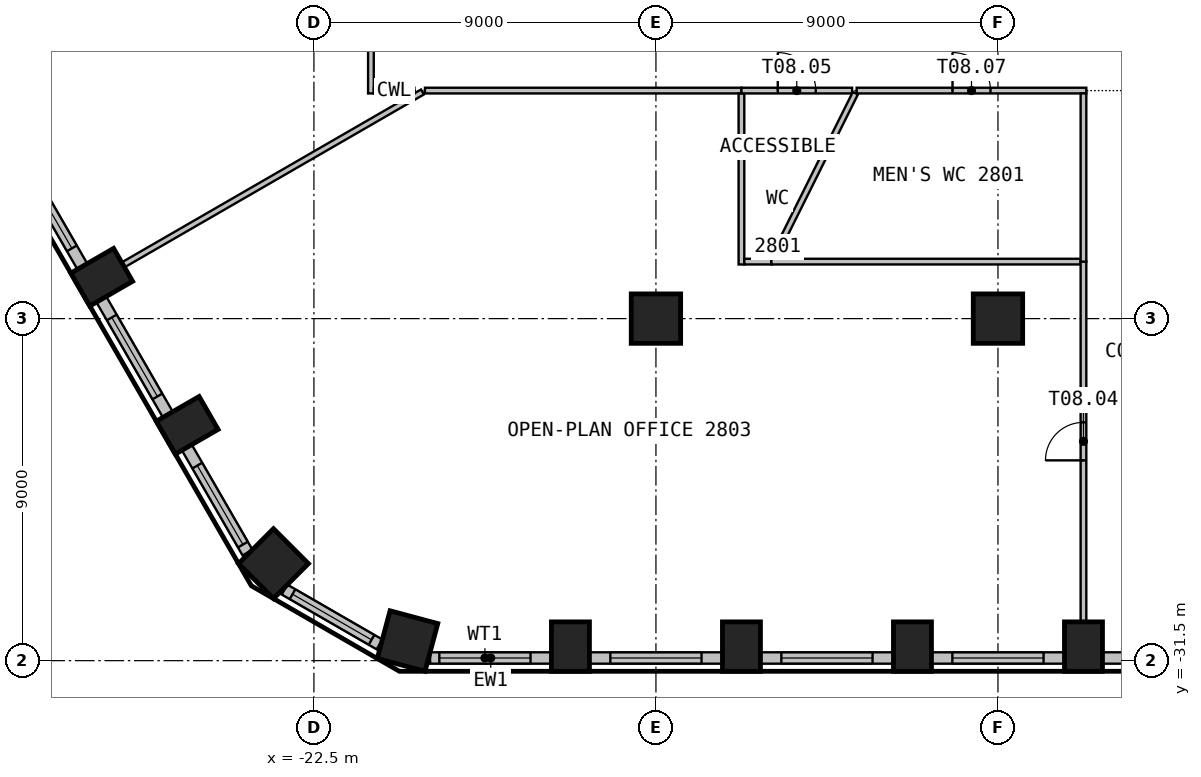
"""IFC4 building model, lengths in metres.
Left out: names, types, materials, properties, quantities, classifications, styles, units other than length and angle.
Written with IfcOpenShell. Run it as: python <this file> out.ifc"""

import sys

from ifc_helpers import new_model, si_unit, direction, frame, frame_2d, origin, origin_2d, place, context, subcontext, project, spatial, rectangle, circle, extrude, element, fill, save


model = new_model("IFC4")
c1 = context("Model", 3, precision=1e-05, world=origin(), true_north=direction((0.0, 1.0)))
c2 = subcontext(c1, "Body", "Model", "MODEL_VIEW")
j1 = project(units=[si_unit("LENGTHUNIT", "METRE"), si_unit("PLANEANGLEUNIT", "RADIAN")], contexts=[c1])
p1 = place(None, origin())
s1 = spatial("IfcSite", under=j1, at=p1, CompositionType="ELEMENT")
p2 = place(p1, origin())
s2 = spatial("IfcBuilding", under=s1, at=p2, CompositionType="ELEMENT")
p3 = place(p2, frame((0.0, 0.0, 116.4)))
s3 = spatial("IfcBuildingStorey", under=s2, at=p3, CompositionType="ELEMENT", Elevation=116.4)
p4 = place(p3, frame((-20.037, -30.984, 0.0), z_axis=(0.0, 0.0, 1.0), x_axis=(0.965925826289, -0.258819045103, 0.0)))
e1 = element("IfcColumn", 1, at=p4, inside=s3, PredefinedType="COLUMN", context=c2, shape_type="SweptSolid", body=[
    extrude(rectangle(XDim=1.3, YDim=1.3, at=origin_2d()), origin(), (0.0, 0.0, 1.0), 3.525),
])
for number, where, z_axis, x_axis in (
    (2, (-15.75, -31.13, 0.0), (0.0, 0.0, 1.0), (1.0, 0.0, 0.0)),
    (3, (-11.25, -31.13, 0.0), (0.0, 0.0, 1.0), (1.0, 0.0, 0.0)),
    (4, (-6.75, -31.13, 0.0), (0.0, 0.0, 1.0), (1.0, 0.0, 0.0)),
    (5, (-2.25, -31.13, 0.0), (0.0, 0.0, 1.0), (1.0, 0.0, 0.0)),
    (6, (-28.084, -21.411, 0.0), (0.0, 0.0, 1.0), (0.5, -0.866, 0.0)),
    (7, (-25.834, -25.308, 0.0), (0.0, 0.0, 1.0), (0.5, -0.866, 0.0)),
):
    element("IfcColumn", number, at=place(p3, frame(where, z_axis=z_axis, x_axis=x_axis)), inside=s3, PredefinedType="COLUMN", context=c2, shape_type="SweptSolid", body=[
        extrude(rectangle(XDim=1.0, YDim=1.3, at=origin_2d()), origin(), (0.0, 0.0, 1.0), 3.525),
    ])
p5 = place(p3, frame((-23.564, -28.947, 0.0), z_axis=(0.0, 0.0, 1.0), x_axis=(0.707106781187, -0.707106781187, 0.0)))
e8 = element("IfcColumn", 8, at=p5, inside=s3, PredefinedType="COLUMN", context=c2, shape_type="SweptSolid", body=[
    extrude(rectangle(XDim=1.3, YDim=1.3, at=origin_2d()), origin(), (0.0, 0.0, 1.0), 3.525),
])
for number, where, z_axis, x_axis in (
    (9, (-13.5, -22.5, 0.0), (0.0, 0.0, 1.0), (1.0, 0.0, 0.0)),
    (10, (-4.5, -22.5, 0.0), (0.0, 0.0, 1.0), (1.0, 0.0, 0.0)),
):
    element("IfcColumn", number, at=place(p3, frame(where, z_axis=z_axis, x_axis=x_axis)), inside=s3, PredefinedType="COLUMN", context=c2, shape_type="SweptSolid", body=[
        extrude(circle(Radius=0.65, at=origin_2d()), origin(), (0.0, 0.0, 1.0), 3.525),
    ])
p6 = place(p3, frame((-19.443, -31.43, 0.0), z_axis=(0.0, 0.0, 1.0), x_axis=(1.0, 0.0, 0.0)))
e11 = element("IfcWall", 11, at=p6, inside=s3, PredefinedType="SOLIDWALL", context=c2, shape_type="SweptSolid", body=[
    extrude(rectangle(XDim=3.192, YDim=0.3, at=frame_2d((1.596, 0.0))), origin(), (0.0, 0.0, 1.0), 3.525),
])
p7 = place(p6, frame((0.243, 0.0, 0.9)))
e12 = element("IfcOpeningElement", 12, at=p7, cuts=e11, PredefinedType="OPENING", context=c2, shape_type="SweptSolid", body=[
    extrude(rectangle(XDim=2.4, YDim=2.1, at=frame_2d((1.2, 1.05))), frame((0.0, 0.16, 0.0), z_axis=(0.0, -1.0, 0.0), x_axis=(1.0, 0.0, 0.0)), (0.0, 0.0, 1.0), 0.32),
])
p8 = place(p3, frame((-15.25, -31.43, 0.0), z_axis=(0.0, 0.0, 1.0), x_axis=(1.0, 0.0, 0.0)))
e13 = element("IfcWall", 13, at=p8, inside=s3, PredefinedType="SOLIDWALL", context=c2, shape_type="SweptSolid", body=[
    extrude(rectangle(XDim=3.499, YDim=0.3, at=frame_2d((1.75, 0.0))), origin(), (0.0, 0.0, 1.0), 3.525),
])
p9 = place(p8, frame((0.55, 0.0, 0.9)))
e14 = element("IfcOpeningElement", 14, at=p9, cuts=e13, PredefinedType="OPENING", context=c2, shape_type="SweptSolid", body=[
    extrude(rectangle(XDim=2.4, YDim=2.1, at=frame_2d((1.2, 1.05))), frame((0.0, 0.16, 0.0), z_axis=(0.0, -1.0, 0.0), x_axis=(1.0, 0.0, 0.0)), (0.0, 0.0, 1.0), 0.32),
])
p10 = place(p3, frame((-10.75, -31.43, 0.0), z_axis=(0.0, 0.0, 1.0), x_axis=(1.0, 0.0, 0.0)))
e15 = element("IfcWall", 15, at=p10, inside=s3, PredefinedType="SOLIDWALL", context=c2, shape_type="SweptSolid", body=[
    extrude(rectangle(XDim=3.499, YDim=0.3, at=frame_2d((1.75, 0.0))), origin(), (0.0, 0.0, 1.0), 3.525),
])
p11 = place(p10, frame((0.55, 0.0, 0.9)))
e16 = element("IfcOpeningElement", 16, at=p11, cuts=e15, PredefinedType="OPENING", context=c2, shape_type="SweptSolid", body=[
    extrude(rectangle(XDim=2.4, YDim=2.1, at=frame_2d((1.2, 1.05))), frame((0.0, 0.16, 0.0), z_axis=(0.0, -1.0, 0.0), x_axis=(1.0, 0.0, 0.0)), (0.0, 0.0, 1.0), 0.32),
])
p12 = place(p3, frame((-6.25, -31.43, 0.0), z_axis=(0.0, 0.0, 1.0), x_axis=(1.0, 0.0, 0.0)))
e17 = element("IfcWall", 17, at=p12, inside=s3, PredefinedType="SOLIDWALL", context=c2, shape_type="SweptSolid", body=[
    extrude(rectangle(XDim=3.499, YDim=0.3, at=frame_2d((1.75, 0.0))), origin(), (0.0, 0.0, 1.0), 3.525),
])
p13 = place(p12, frame((0.55, 0.0, 0.9)))
e18 = element("IfcOpeningElement", 18, at=p13, cuts=e17, PredefinedType="OPENING", context=c2, shape_type="SweptSolid", body=[
    extrude(rectangle(XDim=2.4, YDim=2.1, at=frame_2d((1.2, 1.05))), frame((0.0, 0.16, 0.0), z_axis=(0.0, -1.0, 0.0), x_axis=(1.0, 0.0, 0.0)), (0.0, 0.0, 1.0), 0.32),
])
p14 = place(p3, frame((-1.75, -31.43, 0.0), z_axis=(0.0, 0.0, 1.0), x_axis=(1.0, 0.0, 0.0)))
e19 = element("IfcWall", 19, at=p14, inside=s3, PredefinedType="SOLIDWALL", context=c2, shape_type="SweptSolid", body=[
    extrude(rectangle(XDim=3.499, YDim=0.3, at=frame_2d((1.75, 0.0))), origin(), (0.0, 0.0, 1.0), 3.525),
])
p15 = place(p14, frame((0.55, 0.0, 0.9)))
e20 = element("IfcOpeningElement", 20, at=p15, cuts=e19, PredefinedType="OPENING", context=c2, shape_type="SweptSolid", body=[
    extrude(rectangle(XDim=2.4, YDim=2.1, at=frame_2d((1.2, 1.05))), frame((0.0, 0.16, 0.0), z_axis=(0.0, -1.0, 0.0), x_axis=(1.0, 0.0, 0.0)), (0.0, 0.0, 1.0), 0.32),
])
p16 = place(p3, frame((-30.344, -18.097, 0.0), z_axis=(0.0, 0.0, 1.0), x_axis=(0.499996256241, -0.866027565234, 0.0)))
e21 = element("IfcWall", 21, at=p16, inside=s3, PredefinedType="SOLIDWALL", context=c2, shape_type="SweptSolid", body=[
    extrude(rectangle(XDim=3.499, YDim=0.3, at=frame_2d((1.75, 0.0))), origin(), (0.0, 0.0, 1.0), 3.525),
])
p17 = place(p16, frame((0.55, 0.0, 0.9)))
e22 = element("IfcOpeningElement", 22, at=p17, cuts=e21, PredefinedType="OPENING", context=c2, shape_type="SweptSolid", body=[
    extrude(rectangle(XDim=2.4, YDim=2.1, at=frame_2d((1.2, 1.05))), frame((0.0, 0.16, 0.0), z_axis=(0.0, -1.0, 0.0), x_axis=(1.0, 0.0, 0.0)), (0.0, 0.0, 1.0), 0.32),
])
p18 = place(p3, frame((-28.094, -21.994, 0.0), z_axis=(0.0, 0.0, 1.0), x_axis=(0.499996256241, -0.866027565234, 0.0)))
e23 = element("IfcWall", 23, at=p18, inside=s3, PredefinedType="SOLIDWALL", context=c2, shape_type="SweptSolid", body=[
    extrude(rectangle(XDim=3.499, YDim=0.3, at=frame_2d((1.75, 0.0))), origin(), (0.0, 0.0, 1.0), 3.525),
])
p19 = place(p18, frame((0.55, 0.0, 0.9)))
e24 = element("IfcOpeningElement", 24, at=p19, cuts=e23, PredefinedType="OPENING", context=c2, shape_type="SweptSolid", body=[
    extrude(rectangle(XDim=2.4, YDim=2.1, at=frame_2d((1.2, 1.05))), frame((0.0, 0.16, 0.0), z_axis=(0.0, -1.0, 0.0), x_axis=(1.0, 0.0, 0.0)), (0.0, 0.0, 1.0), 0.32),
])
p20 = place(p3, frame((-25.844, -25.891, 0.0), z_axis=(0.0, 0.0, 1.0), x_axis=(0.500004907028, -0.866022570692, 0.0)))
e25 = element("IfcWall", 25, at=p20, inside=s3, PredefinedType="SOLIDWALL", context=c2, shape_type="SweptSolid", body=[
    extrude(rectangle(XDim=3.192, YDim=0.3, at=frame_2d((1.596, 0.0))), origin(), (0.0, 0.0, 1.0), 3.525),
])
p21 = place(p20, frame((0.55, 0.0, 0.9)))
e26 = element("IfcOpeningElement", 26, at=p21, cuts=e25, PredefinedType="OPENING", context=c2, shape_type="SweptSolid", body=[
    extrude(rectangle(XDim=2.4, YDim=2.1, at=frame_2d((1.2, 1.05))), frame((0.0, 0.16, 0.0), z_axis=(0.0, -1.0, 0.0), x_axis=(1.0, 0.0, 0.0)), (0.0, 0.0, 1.0), 0.32),
])
p22 = place(p3, frame((-23.273, -29.63, 0.0), z_axis=(0.0, 0.0, 1.0), x_axis=(0.866053149362, -0.49995194017, 0.0)))
e27 = element("IfcWall", 27, at=p22, inside=s3, PredefinedType="SOLIDWALL", context=c2, shape_type="SweptSolid", body=[
    extrude(rectangle(XDim=2.885, YDim=0.3, at=frame_2d((1.443, 0.0))), origin(), (0.0, 0.0, 1.0), 3.525),
])
p23 = place(p22, frame((0.243, 0.0, 0.9)))
e28 = element("IfcOpeningElement", 28, at=p23, cuts=e27, PredefinedType="OPENING", context=c2, shape_type="SweptSolid", body=[
    extrude(rectangle(XDim=2.4, YDim=2.1, at=frame_2d((1.2, 1.05))), frame((0.0, 0.16, 0.0), z_axis=(0.0, -1.0, 0.0), x_axis=(1.0, 0.0, 0.0)), (0.0, 0.0, 1.0), 0.32),
])
p24 = place(p3, frame((-19.644, -16.538, 0.0), z_axis=(0.0, 0.0, 1.0), x_axis=(-0.866004606565, -0.500036020111, 0.0)))
e29 = element("IfcWall", 29, at=p24, inside=s3, PredefinedType="PARTITIONING", context=c2, shape_type="SweptSolid", body=[
    extrude(rectangle(XDim=9.076, YDim=0.15, at=frame_2d((4.538, 0.0))), origin(), (0.0, 0.0, 1.0), 3.525),
])
p25 = place(p3, frame((-21.0, 2.813, 0.0), z_axis=(0.0, 0.0, 1.0), x_axis=(0.0, -1.0, 0.0)))
e30 = element("IfcWall", 30, at=p25, inside=s3, PredefinedType="PARTITIONING", context=c2, shape_type="SweptSolid", body=[
    extrude(rectangle(XDim=19.388, YDim=0.15, at=frame_2d((9.694, 0.0))), origin(), (0.0, 0.0, 1.0), 3.525),
])
p26 = place(p25, frame((9.194, 0.0, 0.0)))
e31 = element("IfcOpeningElement", 31, at=p26, cuts=e30, PredefinedType="OPENING", context=c2, shape_type="SweptSolid", body=[
    extrude(rectangle(XDim=1.0, YDim=2.1, at=frame_2d((0.5, 1.05))), frame((0.0, 0.085, 0.0), z_axis=(0.0, -1.0, 0.0), x_axis=(1.0, 0.0, 0.0)), (0.0, 0.0, 1.0), 0.17),
])
p27 = place(p3, frame((-20.925, -16.5, 0.0), z_axis=(0.0, 0.0, 1.0), x_axis=(1.0, 0.0, 0.0)))
e32 = element("IfcWall", 32, at=p27, inside=s3, PredefinedType="PARTITIONING", context=c2, shape_type="SweptSolid", body=[
    extrude(rectangle(XDim=1.071, YDim=0.15, at=frame_2d((0.536, 0.0))), origin(), (0.0, 0.0, 1.0), 3.525),
])
p28 = place(p3, frame((-19.579, -16.5, 0.0), z_axis=(0.0, 0.0, 1.0), x_axis=(1.0, 0.0, 0.0)))
e33 = element("IfcWall", 33, at=p28, inside=s3, PredefinedType="PARTITIONING", context=c2, shape_type="SweptSolid", body=[
    extrude(rectangle(XDim=8.329, YDim=0.15, at=frame_2d((4.165, 0.0))), origin(), (0.0, 0.0, 1.0), 3.525),
])
p29 = place(p3, frame((-11.25, -16.575, 0.0), z_axis=(0.0, 0.0, 1.0), x_axis=(0.0, -1.0, 0.0)))
e34 = element("IfcWall", 34, at=p29, inside=s3, PredefinedType="PARTITIONING", context=c2, shape_type="SweptSolid", body=[
    extrude(rectangle(XDim=4.5, YDim=0.15, at=frame_2d((2.25, 0.0))), origin(), (0.0, 0.0, 1.0), 3.525),
])
p30 = place(p3, frame((-11.175, -21.0, 0.0), z_axis=(0.0, 0.0, 1.0), x_axis=(1.0, 0.0, 0.0)))
e35 = element("IfcWall", 35, at=p30, inside=s3, PredefinedType="PARTITIONING", context=c2, shape_type="SweptSolid", body=[
    extrude(rectangle(XDim=0.714, YDim=0.15, at=frame_2d((0.357, 0.0))), origin(), (0.0, 0.0, 1.0), 3.525),
])
p31 = place(p3, frame((-11.25, -16.5, 0.0), z_axis=(0.0, 0.0, 1.0), x_axis=(1.0, 0.0, 0.0)))
e36 = element("IfcWall", 36, at=p31, inside=s3, PredefinedType="PARTITIONING", context=c2, shape_type="SweptSolid", body=[
    extrude(rectangle(XDim=2.912, YDim=0.15, at=frame_2d((1.456, 0.0))), origin(), (0.0, 0.0, 1.0), 3.525),
])
p32 = place(p31, frame((0.956, 0.0, 0.0)))
e37 = element("IfcOpeningElement", 37, at=p32, cuts=e36, PredefinedType="OPENING", context=c2, shape_type="SweptSolid", body=[
    extrude(rectangle(XDim=1.0, YDim=2.1, at=frame_2d((0.5, 1.05))), frame((0.0, 0.085, 0.0), z_axis=(0.0, -1.0, 0.0), x_axis=(1.0, 0.0, 0.0)), (0.0, 0.0, 1.0), 0.17),
])
p33 = place(p3, frame((-8.251, -16.567, 0.0), z_axis=(0.0, 0.0, 1.0), x_axis=(-0.446101910457, -0.894982170486, 0.0)))
e38 = element("IfcWall", 38, at=p33, inside=s3, PredefinedType="PARTITIONING", context=c2, shape_type="SweptSolid", body=[
    extrude(rectangle(XDim=4.833, YDim=0.15, at=frame_2d((2.417, 0.0))), origin(), (0.0, 0.0, 1.0), 3.525),
])
p34 = place(p3, frame((-10.461, -21.0, 0.0), z_axis=(0.0, 0.0, 1.0), x_axis=(1.0, 0.0, 0.0)))
e39 = element("IfcWall", 39, at=p34, inside=s3, PredefinedType="PARTITIONING", context=c2, shape_type="SweptSolid", body=[
    extrude(rectangle(XDim=8.136, YDim=0.15, at=frame_2d((4.068, 0.0))), origin(), (0.0, 0.0, 1.0), 3.525),
])
p35 = place(p3, frame((-8.218, -16.5, 0.0), z_axis=(0.0, 0.0, 1.0), x_axis=(1.0, 0.0, 0.0)))
e40 = element("IfcWall", 40, at=p35, inside=s3, PredefinedType="PARTITIONING", context=c2, shape_type="SweptSolid", body=[
    extrude(rectangle(XDim=6.043, YDim=0.15, at=frame_2d((3.021, 0.0))), origin(), (0.0, 0.0, 1.0), 3.525),
])
p36 = place(p35, frame((2.521, 0.0, 0.0)))
e41 = element("IfcOpeningElement", 41, at=p36, cuts=e40, PredefinedType="OPENING", context=c2, shape_type="SweptSolid", body=[
    extrude(rectangle(XDim=1.0, YDim=2.1, at=frame_2d((0.5, 1.05))), frame((0.0, 0.085, 0.0), z_axis=(0.0, -1.0, 0.0), x_axis=(1.0, 0.0, 0.0)), (0.0, 0.0, 1.0), 0.17),
])
p37 = place(p3, frame((-2.25, -30.46, 0.0), z_axis=(0.0, 0.0, 1.0), x_axis=(0.0, 1.0, 0.0)))
e42 = element("IfcWall", 42, at=p37, inside=s3, PredefinedType="PARTITIONING", context=c2, shape_type="SweptSolid", body=[
    extrude(rectangle(XDim=9.46, YDim=0.15, at=frame_2d((4.73, 0.0))), origin(), (0.0, 0.0, 1.0), 3.525),
])
p38 = place(p37, frame((4.23, 0.0, 0.0)))
e43 = element("IfcOpeningElement", 43, at=p38, cuts=e42, PredefinedType="OPENING", context=c2, shape_type="SweptSolid", body=[
    extrude(rectangle(XDim=1.0, YDim=2.1, at=frame_2d((0.5, 1.05))), frame((0.0, 0.085, 0.0), z_axis=(0.0, -1.0, 0.0), x_axis=(1.0, 0.0, 0.0)), (0.0, 0.0, 1.0), 0.17),
])
p39 = place(p3, frame((-2.25, -21.0, 0.0), z_axis=(0.0, 0.0, 1.0), x_axis=(0.0, 1.0, 0.0)))
e44 = element("IfcWall", 44, at=p39, inside=s3, PredefinedType="PARTITIONING", context=c2, shape_type="SweptSolid", body=[
    extrude(rectangle(XDim=4.425, YDim=0.15, at=frame_2d((2.212, 0.0))), origin(), (0.0, 0.0, 1.0), 3.525),
])
p40 = place(p7, origin())
e45 = element("IfcWindow", 45, at=p40, inside=s3, PartitioningType="SINGLE_PANEL", PredefinedType="WINDOW", context=c2, shape_type="SweptSolid", body=[
    extrude(rectangle(XDim=2.4, YDim=2.1, at=frame_2d((1.2, 1.05))), frame((0.0, 0.03, 0.0), z_axis=(0.0, -1.0, 0.0), x_axis=(1.0, 0.0, 0.0)), (0.0, 0.0, 1.0), 0.06),
])
fill(e12, e45)
p41 = place(p9, origin())
e46 = element("IfcWindow", 46, at=p41, inside=s3, PartitioningType="SINGLE_PANEL", PredefinedType="WINDOW", context=c2, shape_type="SweptSolid", body=[
    extrude(rectangle(XDim=2.4, YDim=2.1, at=frame_2d((1.2, 1.05))), frame((0.0, 0.03, 0.0), z_axis=(0.0, -1.0, 0.0), x_axis=(1.0, 0.0, 0.0)), (0.0, 0.0, 1.0), 0.06),
])
fill(e14, e46)
p42 = place(p11, origin())
e47 = element("IfcWindow", 47, at=p42, inside=s3, PartitioningType="SINGLE_PANEL", PredefinedType="WINDOW", context=c2, shape_type="SweptSolid", body=[
    extrude(rectangle(XDim=2.4, YDim=2.1, at=frame_2d((1.2, 1.05))), frame((0.0, 0.03, 0.0), z_axis=(0.0, -1.0, 0.0), x_axis=(1.0, 0.0, 0.0)), (0.0, 0.0, 1.0), 0.06),
])
fill(e16, e47)
p43 = place(p13, origin())
e48 = element("IfcWindow", 48, at=p43, inside=s3, PartitioningType="SINGLE_PANEL", PredefinedType="WINDOW", context=c2, shape_type="SweptSolid", body=[
    extrude(rectangle(XDim=2.4, YDim=2.1, at=frame_2d((1.2, 1.05))), frame((0.0, 0.03, 0.0), z_axis=(0.0, -1.0, 0.0), x_axis=(1.0, 0.0, 0.0)), (0.0, 0.0, 1.0), 0.06),
])
fill(e18, e48)
p44 = place(p17, origin())
e49 = element("IfcWindow", 49, at=p44, inside=s3, PartitioningType="SINGLE_PANEL", PredefinedType="WINDOW", context=c2, shape_type="SweptSolid", body=[
    extrude(rectangle(XDim=2.4, YDim=2.1, at=frame_2d((1.2, 1.05))), frame((0.0, 0.03, 0.0), z_axis=(0.0, -1.0, 0.0), x_axis=(1.0, 0.0, 0.0)), (0.0, 0.0, 1.0), 0.06),
])
fill(e22, e49)
p45 = place(p19, origin())
e50 = element("IfcWindow", 50, at=p45, inside=s3, PartitioningType="SINGLE_PANEL", PredefinedType="WINDOW", context=c2, shape_type="SweptSolid", body=[
    extrude(rectangle(XDim=2.4, YDim=2.1, at=frame_2d((1.2, 1.05))), frame((0.0, 0.03, 0.0), z_axis=(0.0, -1.0, 0.0), x_axis=(1.0, 0.0, 0.0)), (0.0, 0.0, 1.0), 0.06),
])
fill(e24, e50)
p46 = place(p21, origin())
e51 = element("IfcWindow", 51, at=p46, inside=s3, PartitioningType="SINGLE_PANEL", PredefinedType="WINDOW", context=c2, shape_type="SweptSolid", body=[
    extrude(rectangle(XDim=2.4, YDim=2.1, at=frame_2d((1.2, 1.05))), frame((0.0, 0.03, 0.0), z_axis=(0.0, -1.0, 0.0), x_axis=(1.0, 0.0, 0.0)), (0.0, 0.0, 1.0), 0.06),
])
fill(e26, e51)
p47 = place(p23, origin())
e52 = element("IfcWindow", 52, at=p47, inside=s3, PartitioningType="SINGLE_PANEL", PredefinedType="WINDOW", context=c2, shape_type="SweptSolid", body=[
    extrude(rectangle(XDim=2.4, YDim=2.1, at=frame_2d((1.2, 1.05))), frame((0.0, 0.03, 0.0), z_axis=(0.0, -1.0, 0.0), x_axis=(1.0, 0.0, 0.0)), (0.0, 0.0, 1.0), 0.06),
])
fill(e28, e52)
p48 = place(p38, origin())
e53 = element("IfcDoor", 53, at=p48, inside=s3, OperationType="SINGLE_SWING_LEFT", PredefinedType="DOOR", context=c2, shape_type="SweptSolid", body=[
    extrude(rectangle(XDim=1.0, YDim=2.1, at=frame_2d((0.5, 1.05))), frame((0.0, 0.025, 0.0), z_axis=(0.0, -1.0, 0.0), x_axis=(1.0, 0.0, 0.0)), (0.0, 0.0, 1.0), 0.05),
])
fill(e43, e53)
p49 = place(p32, origin())
e54 = element("IfcDoor", 54, at=p49, inside=s3, OperationType="SINGLE_SWING_RIGHT", PredefinedType="DOOR", context=c2, shape_type="SweptSolid", body=[
    extrude(rectangle(XDim=1.0, YDim=2.1, at=frame_2d((0.5, 1.05))), frame((0.0, 0.025, 0.0), z_axis=(0.0, -1.0, 0.0), x_axis=(1.0, 0.0, 0.0)), (0.0, 0.0, 1.0), 0.05),
])
fill(e37, e54)
p50 = place(p36, origin())
e55 = element("IfcDoor", 55, at=p50, inside=s3, OperationType="SINGLE_SWING_RIGHT", PredefinedType="DOOR", context=c2, shape_type="SweptSolid", body=[
    extrude(rectangle(XDim=1.0, YDim=2.1, at=frame_2d((0.5, 1.05))), frame((0.0, 0.025, 0.0), z_axis=(0.0, -1.0, 0.0), x_axis=(1.0, 0.0, 0.0)), (0.0, 0.0, 1.0), 0.05),
])
fill(e41, e55)
save(model, sys.argv[1])
